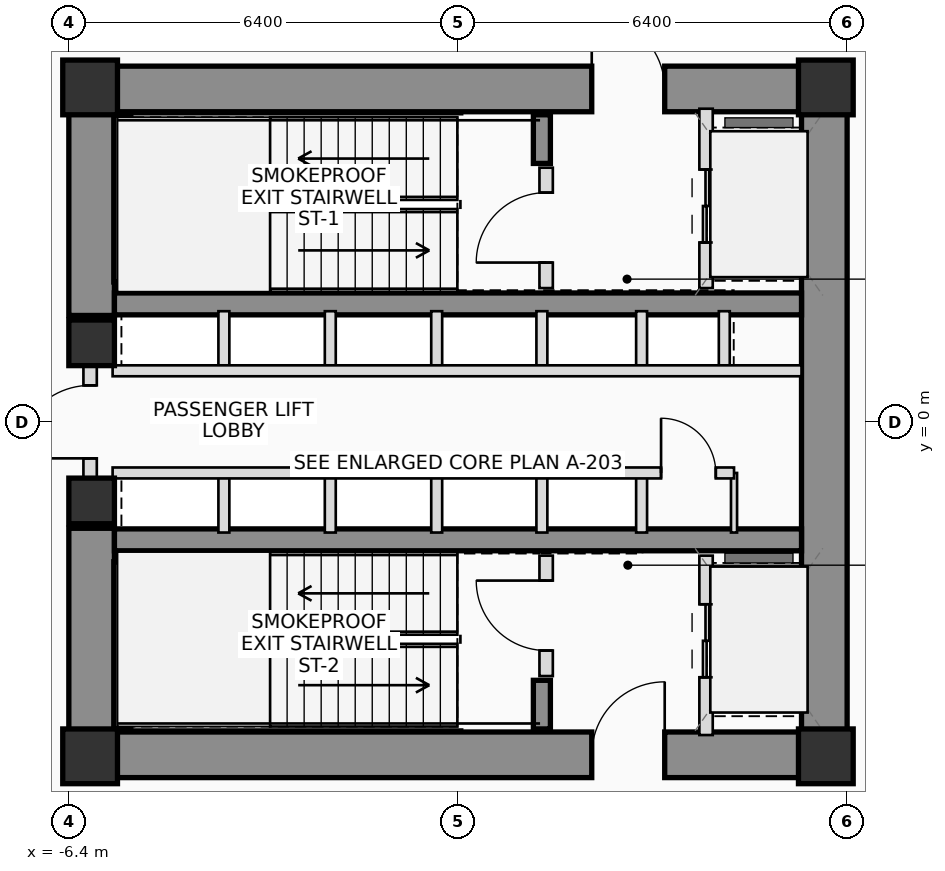
"""IFC4 building model, lengths in metres.
Left out: names, types, materials, properties, quantities, classifications, styles, units other than length and angle.
Written with IfcOpenShell. Run it as: python <this file> out.ifc"""

import sys

from ifc_helpers import new_model, si_unit, direction, frame, frame_2d, origin, origin_2d, place, context, subcontext, project, spatial, rectangle, extrude, source, transform, mapped, element, fill, save


model = new_model("IFC4")
c1 = context("Model", 3, precision=1e-05, world=origin(), true_north=direction((0.0, 1.0)))
c2 = subcontext(c1, "Body", "Model", "MODEL_VIEW")
j1 = project(units=[si_unit("LENGTHUNIT", "METRE"), si_unit("PLANEANGLEUNIT", "RADIAN")], contexts=[c1])
p1 = place(None, origin())
s1 = spatial("IfcSite", under=j1, at=p1, CompositionType="ELEMENT")
p2 = place(p1, origin())
s2 = spatial("IfcBuilding", under=s1, at=p2, CompositionType="ELEMENT")
p3 = place(p2, frame((0.0, 0.0, 16.2)))
s3 = spatial("IfcBuildingStorey", under=s2, at=p3, CompositionType="ELEMENT", Elevation=16.2)
m1 = source(origin(), c2, "Body", "SweptSolid", [
    extrude(rectangle(XDim=0.9, YDim=0.9, at=origin_2d()), origin(), (0.0, 0.0, 1.0), 3.9),
])
for number, where, z_axis, x_axis in (
    (1, (-6.05, -5.5, 0.0), (0.0, 0.0, 1.0), (1.0, 0.0, 0.0)),
    (2, (6.05, -5.5, 0.0), (0.0, 0.0, 1.0), (1.0, 0.0, 0.0)),
    (3, (6.05, 5.5, 0.0), (0.0, 0.0, 1.0), (1.0, 0.0, 0.0)),
    (4, (-6.05, 5.5, 0.0), (0.0, 0.0, 1.0), (1.0, 0.0, 0.0)),
):
    element("IfcColumn", number, at=place(p3, frame(where, z_axis=z_axis, x_axis=x_axis)), inside=s3, PredefinedType="COLUMN", context=c2, shape_type="MappedRepresentation", body=[
        mapped(m1, transform((0.0, 0.0, 0.0), scale=1.0)),
    ])
p4 = place(p3, frame((-6.4, 5.475, 0.0), z_axis=(0.0, 0.0, 1.0), x_axis=(1.0, 0.0, 0.0)))
e5 = element("IfcWall", 5, at=p4, inside=s3, PredefinedType="SHEAR", context=c2, shape_type="SweptSolid", body=[
    extrude(rectangle(XDim=12.8, YDim=0.75, at=frame_2d((6.4, 0.0))), origin(), (0.0, 0.0, 1.0), 3.9),
])
p5 = place(p4, frame((8.6, 0.0, 0.0)))
e6 = element("IfcOpeningElement", 6, at=p5, cuts=e5, PredefinedType="OPENING", context=c2, shape_type="SweptSolid", body=[
    extrude(rectangle(XDim=1.2, YDim=2.2, at=frame_2d((0.6, 1.1))), frame((0.0, 0.385, 0.0), z_axis=(0.0, -1.0, 0.0), x_axis=(1.0, 0.0, 0.0)), (0.0, 0.0, 1.0), 0.77),
])
p6 = place(p3, frame((-6.4, -5.475, 0.0), z_axis=(0.0, 0.0, 1.0), x_axis=(1.0, 0.0, 0.0)))
e7 = element("IfcWall", 7, at=p6, inside=s3, PredefinedType="SHEAR", context=c2, shape_type="SweptSolid", body=[
    extrude(rectangle(XDim=12.8, YDim=0.75, at=frame_2d((6.4, 0.0))), origin(), (0.0, 0.0, 1.0), 3.9),
])
p7 = place(p6, frame((8.6, 0.0, 0.0)))
e8 = element("IfcOpeningElement", 8, at=p7, cuts=e7, PredefinedType="OPENING", context=c2, shape_type="SweptSolid", body=[
    extrude(rectangle(XDim=1.2, YDim=2.2, at=frame_2d((0.6, 1.1))), frame((0.0, 0.385, 0.0), z_axis=(0.0, -1.0, 0.0), x_axis=(1.0, 0.0, 0.0)), (0.0, 0.0, 1.0), 0.77),
])
p8 = place(p3, frame((6.025, -5.1, 0.0), z_axis=(0.0, 0.0, 1.0), x_axis=(0.0, 1.0, 0.0)))
e9 = element("IfcWall", 9, at=p8, inside=s3, PredefinedType="SHEAR", context=c2, shape_type="SweptSolid", body=[
    extrude(rectangle(XDim=10.2, YDim=0.75, at=frame_2d((5.1, 0.0))), origin(), (0.0, 0.0, 1.0), 3.9),
])
for number, where, z_axis, x_axis in (
    (10, (-6.025, -5.1, 0.0), (0.0, 0.0, 1.0), (0.0, 1.0, 0.0)),
    (11, (-6.025, 1.75, 0.0), (0.0, 0.0, 1.0), (0.0, 1.0, 0.0)),
):
    element("IfcWall", number, at=place(p3, frame(where, z_axis=z_axis, x_axis=x_axis)), inside=s3, PredefinedType="SHEAR", context=c2, shape_type="SweptSolid", body=[
        extrude(rectangle(XDim=3.35, YDim=0.75, at=frame_2d((1.675, 0.0))), origin(), (0.0, 0.0, 1.0), 3.9),
    ])
for number, where, z_axis, x_axis in (
    (12, (-5.65, 1.94, 0.0), (0.0, 0.0, 1.0), (1.0, 0.0, 0.0)),
    (13, (-5.65, -1.94, 0.0), (0.0, 0.0, 1.0), (1.0, 0.0, 0.0)),
):
    element("IfcWall", number, at=place(p3, frame(where, z_axis=z_axis, x_axis=x_axis)), inside=s3, PredefinedType="SHEAR", context=c2, shape_type="SweptSolid", body=[
        extrude(rectangle(XDim=11.3, YDim=0.36, at=frame_2d((5.65, 0.0))), origin(), (0.0, 0.0, 1.0), 3.9),
    ])
p9 = place(p3, frame((-5.52, 2.3, 0.0), z_axis=(0.0, 0.0, 1.0), x_axis=(0.0, 1.0, 0.0)))
e14 = element("IfcWall", 14, at=p9, inside=s3, PredefinedType="SHEAR", context=c2, shape_type="SweptSolid", body=[
    extrude(rectangle(XDim=2.75, YDim=0.28, at=frame_2d((1.375, 0.0))), origin(), (0.0, 0.0, 1.0), 3.9),
])
p10 = place(p3, frame((1.38, 4.25, 0.0), z_axis=(0.0, 0.0, 1.0), x_axis=(0.0, 1.0, 0.0)))
e15 = element("IfcWall", 15, at=p10, inside=s3, PredefinedType="SHEAR", context=c2, shape_type="SweptSolid", body=[
    extrude(rectangle(XDim=0.8, YDim=0.28, at=frame_2d((0.4, 0.0))), origin(), (0.0, 0.0, 1.0), 3.9),
])
p11 = place(p3, frame((-5.52, -5.05, 0.0), z_axis=(0.0, 0.0, 1.0), x_axis=(0.0, 1.0, 0.0)))
e16 = element("IfcWall", 16, at=p11, inside=s3, PredefinedType="SHEAR", context=c2, shape_type="SweptSolid", body=[
    extrude(rectangle(XDim=2.75, YDim=0.28, at=frame_2d((1.375, 0.0))), origin(), (0.0, 0.0, 1.0), 3.9),
])
p12 = place(p3, frame((1.38, -5.05, 0.0), z_axis=(0.0, 0.0, 1.0), x_axis=(0.0, 1.0, 0.0)))
e17 = element("IfcWall", 17, at=p12, inside=s3, PredefinedType="SHEAR", context=c2, shape_type="SweptSolid", body=[
    extrude(rectangle(XDim=0.8, YDim=0.28, at=frame_2d((0.4, 0.0))), origin(), (0.0, 0.0, 1.0), 3.9),
])
m2 = source(origin(), c2, "Body", "SweptSolid", [
    extrude(rectangle(XDim=0.75, YDim=0.75, at=origin_2d()), origin(), (0.0, 0.0, 1.0), 3.9),
])
for number, where, z_axis, x_axis in (
    (18, (-6.025, -1.3, 0.0), (0.0, 0.0, 1.0), (1.0, 0.0, 0.0)),
    (19, (-6.025, 1.3, 0.0), (0.0, 0.0, 1.0), (1.0, 0.0, 0.0)),
):
    element("IfcColumn", number, at=place(p3, frame(where, z_axis=z_axis, x_axis=x_axis)), inside=s3, PredefinedType="COLUMN", context=c2, shape_type="MappedRepresentation", body=[
        mapped(m2, transform((0.0, 0.0, 0.0), scale=1.0)),
    ])
p13 = place(p3, frame((-6.05, -0.95, 0.0), z_axis=(0.0, 0.0, 1.0), x_axis=(0.0, 1.0, 0.0)))
e20 = element("IfcWall", 20, at=p13, inside=s3, PredefinedType="PLUMBINGWALL", context=c2, shape_type="SweptSolid", body=[
    extrude(rectangle(XDim=1.9, YDim=0.22, at=frame_2d((0.95, 0.0))), origin(), (0.0, 0.0, 1.0), 2.54),
])
p14 = place(p13, frame((0.35, 0.0, 0.0)))
e21 = element("IfcOpeningElement", 21, at=p14, cuts=e20, PredefinedType="OPENING", context=c2, shape_type="SweptSolid", body=[
    extrude(rectangle(XDim=1.2, YDim=2.2, at=frame_2d((0.6, 1.1))), frame((0.0, 0.12, 0.0), z_axis=(0.0, -1.0, 0.0), x_axis=(1.0, 0.0, 0.0)), (0.0, 0.0, 1.0), 0.24),
])
p15 = place(p3, frame((1.45, 2.2, 0.0), z_axis=(0.0, 0.0, 1.0), x_axis=(0.0, 1.0, 0.0)))
e22 = element("IfcWall", 22, at=p15, inside=s3, PredefinedType="PLUMBINGWALL", context=c2, shape_type="SweptSolid", body=[
    extrude(rectangle(XDim=1.98, YDim=0.22, at=frame_2d((0.99, 0.0))), origin(), (0.0, 0.0, 1.0), 3.56),
])
p16 = place(p15, frame((0.42, 0.0, 0.0)))
e23 = element("IfcOpeningElement", 23, at=p16, cuts=e22, PredefinedType="OPENING", context=c2, shape_type="SweptSolid", body=[
    extrude(rectangle(XDim=1.15, YDim=2.15, at=frame_2d((0.575, 1.075))), frame((0.0, 0.12, 0.0), z_axis=(0.0, -1.0, 0.0), x_axis=(1.0, 0.0, 0.0)), (0.0, 0.0, 1.0), 0.24),
])
p17 = place(p3, frame((4.08, 2.2, 0.0), z_axis=(0.0, 0.0, 1.0), x_axis=(0.0, 1.0, 0.0)))
e24 = element("IfcWall", 24, at=p17, inside=s3, PredefinedType="PLUMBINGWALL", context=c2, shape_type="SweptSolid", body=[
    extrude(rectangle(XDim=2.95, YDim=0.22, at=frame_2d((1.475, 0.0))), origin(), (0.0, 0.0, 1.0), 3.56),
])
p18 = place(p17, frame((0.75, 0.0, 0.0)))
e25 = element("IfcOpeningElement", 25, at=p18, cuts=e24, PredefinedType="OPENING", context=c2, shape_type="SweptSolid", body=[
    extrude(rectangle(XDim=1.2, YDim=2.25, at=frame_2d((0.6, 1.125))), frame((0.0, 0.12, 0.0), z_axis=(0.0, -1.0, 0.0), x_axis=(1.0, 0.0, 0.0)), (0.0, 0.0, 1.0), 0.24),
])
p19 = place(p3, frame((1.45, -4.18, 0.0), z_axis=(0.0, 0.0, 1.0), x_axis=(0.0, 1.0, 0.0)))
e26 = element("IfcWall", 26, at=p19, inside=s3, PredefinedType="PLUMBINGWALL", context=c2, shape_type="SweptSolid", body=[
    extrude(rectangle(XDim=1.98, YDim=0.22, at=frame_2d((0.99, 0.0))), origin(), (0.0, 0.0, 1.0), 3.56),
])
p20 = place(p19, frame((0.42, 0.0, 0.0)))
e27 = element("IfcOpeningElement", 27, at=p20, cuts=e26, PredefinedType="OPENING", context=c2, shape_type="SweptSolid", body=[
    extrude(rectangle(XDim=1.15, YDim=2.15, at=frame_2d((0.575, 1.075))), frame((0.0, 0.12, 0.0), z_axis=(0.0, -1.0, 0.0), x_axis=(1.0, 0.0, 0.0)), (0.0, 0.0, 1.0), 0.24),
])
p21 = place(p3, frame((4.08, -5.15, 0.0), z_axis=(0.0, 0.0, 1.0), x_axis=(0.0, 1.0, 0.0)))
e28 = element("IfcWall", 28, at=p21, inside=s3, PredefinedType="PLUMBINGWALL", context=c2, shape_type="SweptSolid", body=[
    extrude(rectangle(XDim=2.95, YDim=0.22, at=frame_2d((1.475, 0.0))), origin(), (0.0, 0.0, 1.0), 3.56),
])
p22 = place(p21, frame((0.95, 0.0, 0.0)))
e29 = element("IfcOpeningElement", 29, at=p22, cuts=e28, PredefinedType="OPENING", context=c2, shape_type="SweptSolid", body=[
    extrude(rectangle(XDim=1.2, YDim=2.25, at=frame_2d((0.6, 1.125))), frame((0.0, 0.12, 0.0), z_axis=(0.0, -1.0, 0.0), x_axis=(1.0, 0.0, 0.0)), (0.0, 0.0, 1.0), 0.24),
])
for number, where, z_axis, x_axis in (
    (30, (-3.85, 0.84, 0.0), (0.0, 0.0, 1.0), (0.0, 1.0, 0.0)),
    (31, (-3.85, -1.82, 0.0), (0.0, 0.0, 1.0), (0.0, 1.0, 0.0)),
    (32, (-2.1, 0.84, 0.0), (0.0, 0.0, 1.0), (0.0, 1.0, 0.0)),
    (33, (-2.1, -1.82, 0.0), (0.0, 0.0, 1.0), (0.0, 1.0, 0.0)),
    (34, (-0.35, 0.84, 0.0), (0.0, 0.0, 1.0), (0.0, 1.0, 0.0)),
    (35, (-0.35, -1.82, 0.0), (0.0, 0.0, 1.0), (0.0, 1.0, 0.0)),
    (36, (1.38, 0.84, 0.0), (0.0, 0.0, 1.0), (0.0, 1.0, 0.0)),
    (37, (1.38, -1.82, 0.0), (0.0, 0.0, 1.0), (0.0, 1.0, 0.0)),
    (38, (3.02, 0.84, 0.0), (0.0, 0.0, 1.0), (0.0, 1.0, 0.0)),
    (39, (4.38, 0.84, 0.0), (0.0, 0.0, 1.0), (0.0, 1.0, 0.0)),
    (40, (3.02, -1.82, 0.0), (0.0, 0.0, 1.0), (0.0, 1.0, 0.0)),
):
    element("IfcWall", number, at=place(p3, frame(where, z_axis=z_axis, x_axis=x_axis)), inside=s3, PredefinedType="PLUMBINGWALL", context=c2, shape_type="SweptSolid", body=[
        extrude(rectangle(XDim=0.98, YDim=0.18, at=frame_2d((0.49, 0.0))), origin(), (0.0, 0.0, 1.0), 3.56),
    ])
p23 = place(p3, frame((4.54, -1.82, 0.0), z_axis=(0.0, 0.0, 1.0), x_axis=(0.0, 1.0, 0.0)))
e41 = element("IfcWall", 41, at=p23, inside=s3, PredefinedType="PARTITIONING", context=c2, shape_type="SweptSolid", body=[
    extrude(rectangle(XDim=0.98, YDim=0.1, at=frame_2d((0.49, 0.0))), origin(), (0.0, 0.0, 1.0), 3.56),
])
p24 = place(p3, frame((-5.68, 0.84, 0.0), z_axis=(0.0, 0.0, 1.0), x_axis=(1.0, 0.0, 0.0)))
e42 = element("IfcWall", 42, at=p24, inside=s3, PredefinedType="PLUMBINGWALL", context=c2, shape_type="SweptSolid", body=[
    extrude(rectangle(XDim=11.33, YDim=0.18, at=frame_2d((5.665, 0.0))), origin(), (0.0, 0.0, 1.0), 3.56),
])
p25 = place(p3, frame((-5.68, -0.84, 0.0), z_axis=(0.0, 0.0, 1.0), x_axis=(1.0, 0.0, 0.0)))
e43 = element("IfcWall", 43, at=p25, inside=s3, PredefinedType="PLUMBINGWALL", context=c2, shape_type="SweptSolid", body=[
    extrude(rectangle(XDim=10.22, YDim=0.18, at=frame_2d((5.11, 0.0))), origin(), (0.0, 0.0, 1.0), 3.56),
])
p26 = place(p25, frame((9.02, 0.0, 0.0)))
e44 = element("IfcOpeningElement", 44, at=p26, cuts=e43, PredefinedType="OPENING", context=c2, shape_type="SweptSolid", body=[
    extrude(rectangle(XDim=0.9, YDim=2.05, at=frame_2d((0.45, 1.025))), frame((0.0, 0.1, 0.0), z_axis=(0.0, -1.0, 0.0), x_axis=(1.0, 0.0, 0.0)), (0.0, 0.0, 1.0), 0.2),
])
p27 = place(p5, origin())
e45 = element("IfcDoor", 45, at=p27, inside=s3, OperationType="SINGLE_SWING_LEFT", PredefinedType="DOOR", context=c2, shape_type="SweptSolid", body=[
    extrude(rectangle(XDim=1.2, YDim=2.2, at=frame_2d((0.6, 1.1))), frame((0.0, 0.025, 0.0), z_axis=(0.0, -1.0, 0.0), x_axis=(1.0, 0.0, 0.0)), (0.0, 0.0, 1.0), 0.05),
])
fill(e6, e45)
p28 = place(p7, origin())
e46 = element("IfcDoor", 46, at=p28, inside=s3, OperationType="SINGLE_SWING_RIGHT", PredefinedType="DOOR", context=c2, shape_type="SweptSolid", body=[
    extrude(rectangle(XDim=1.2, YDim=2.2, at=frame_2d((0.6, 1.1))), frame((0.0, 0.025, 0.0), z_axis=(0.0, -1.0, 0.0), x_axis=(1.0, 0.0, 0.0)), (0.0, 0.0, 1.0), 0.05),
])
fill(e8, e46)
p29 = place(p14, origin())
e47 = element("IfcDoor", 47, at=p29, inside=s3, OperationType="SINGLE_SWING_LEFT", PredefinedType="DOOR", context=c2, shape_type="SweptSolid", body=[
    extrude(rectangle(XDim=1.2, YDim=2.2, at=frame_2d((0.6, 1.1))), frame((0.0, 0.025, 0.0), z_axis=(0.0, -1.0, 0.0), x_axis=(1.0, 0.0, 0.0)), (0.0, 0.0, 1.0), 0.05),
])
fill(e21, e47)
p30 = place(p16, origin())
e48 = element("IfcDoor", 48, at=p30, inside=s3, OperationType="SINGLE_SWING_LEFT", PredefinedType="DOOR", context=c2, shape_type="SweptSolid", body=[
    extrude(rectangle(XDim=1.15, YDim=2.15, at=frame_2d((0.575, 1.075))), frame((0.0, 0.025, 0.0), z_axis=(0.0, -1.0, 0.0), x_axis=(1.0, 0.0, 0.0)), (0.0, 0.0, 1.0), 0.05),
])
fill(e23, e48)
p31 = place(p18, origin())
e49 = element("IfcDoor", 49, at=p31, inside=s3, OperationType="DOUBLE_DOOR_SLIDING", PredefinedType="DOOR", context=c2, shape_type="SweptSolid", body=[
    extrude(rectangle(XDim=1.2, YDim=2.25, at=frame_2d((0.6, 1.125))), frame((0.0, 0.025, 0.0), z_axis=(0.0, -1.0, 0.0), x_axis=(1.0, 0.0, 0.0)), (0.0, 0.0, 1.0), 0.05),
])
fill(e25, e49)
p32 = place(p20, origin())
e50 = element("IfcDoor", 50, at=p32, inside=s3, OperationType="SINGLE_SWING_RIGHT", PredefinedType="DOOR", context=c2, shape_type="SweptSolid", body=[
    extrude(rectangle(XDim=1.15, YDim=2.15, at=frame_2d((0.575, 1.075))), frame((0.0, 0.025, 0.0), z_axis=(0.0, -1.0, 0.0), x_axis=(1.0, 0.0, 0.0)), (0.0, 0.0, 1.0), 0.05),
])
fill(e27, e50)
p33 = place(p22, origin())
e51 = element("IfcDoor", 51, at=p33, inside=s3, OperationType="DOUBLE_DOOR_SLIDING", PredefinedType="DOOR", context=c2, shape_type="SweptSolid", body=[
    extrude(rectangle(XDim=1.2, YDim=2.25, at=frame_2d((0.6, 1.125))), frame((0.0, 0.025, 0.0), z_axis=(0.0, -1.0, 0.0), x_axis=(1.0, 0.0, 0.0)), (0.0, 0.0, 1.0), 0.05),
])
fill(e29, e51)
p34 = place(p26, origin())
e52 = element("IfcDoor", 52, at=p34, inside=s3, OperationType="SINGLE_SWING_LEFT", PredefinedType="DOOR", context=c2, shape_type="SweptSolid", body=[
    extrude(rectangle(XDim=0.9, YDim=2.05, at=frame_2d((0.45, 1.025))), frame((0.0, 0.025, 0.0), z_axis=(0.0, -1.0, 0.0), x_axis=(1.0, 0.0, 0.0)), (0.0, 0.0, 1.0), 0.05),
])
fill(e44, e52)
save(model, sys.argv[1])
